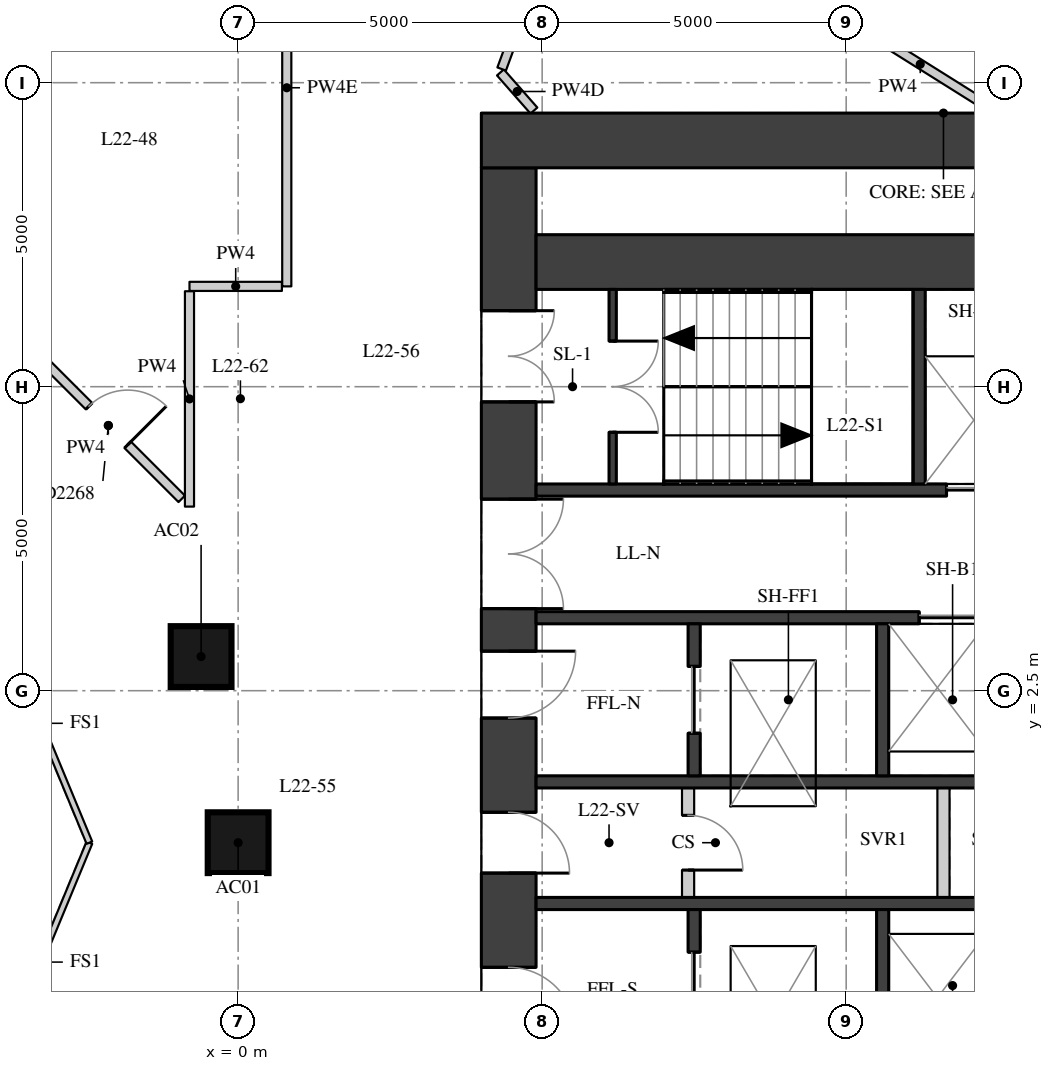
"""IFC4 building model, lengths in metres.
Left out: names, types, materials, properties, quantities, classifications, styles, units other than length and angle.
Written with IfcOpenShell. Run it as: python <this file> out.ifc"""

import sys

from ifc_helpers import new_model, si_unit, direction, frame, frame_2d, origin, origin_2d, place, context, subcontext, project, spatial, rectangle, extrude, element, fill, save


model = new_model("IFC4")
c1 = context("Model", 3, precision=1e-05, world=origin(), true_north=direction((0.0, 1.0)))
c2 = subcontext(c1, "Body", "Model", "MODEL_VIEW")
j1 = project(units=[si_unit("LENGTHUNIT", "METRE"), si_unit("PLANEANGLEUNIT", "RADIAN")], contexts=[c1])
p1 = place(None, origin())
s1 = spatial("IfcSite", under=j1, at=p1, CompositionType="ELEMENT")
p2 = place(p1, origin())
s2 = spatial("IfcBuilding", under=s1, at=p2, CompositionType="ELEMENT")
p3 = place(p2, frame((0.0, 0.0, 81.1)))
s3 = spatial("IfcBuildingStorey", under=s2, at=p3, CompositionType="ELEMENT", Elevation=81.1)
for number, where, z_axis, x_axis in (
    (1, (0.0, 0.0, 0.0), (0.0, 0.0, 1.0), (1.0, 0.0, 0.0)),
    (2, (-0.609, 3.062, 0.0), (0.0, 0.0, 1.0), (1.0, 0.0, 0.0)),
):
    element("IfcColumn", number, at=place(p3, frame(where, z_axis=z_axis, x_axis=x_axis)), inside=s3, PredefinedType="COLUMN", context=c2, shape_type="SweptSolid", body=[
        extrude(rectangle(XDim=1.0, YDim=1.0, at=origin_2d()), origin(), (0.0, 0.0, 1.0), 3.3),
    ])
p4 = place(p3, frame((4.45, -11.1, 0.0), z_axis=(0.0, 0.0, 1.0), x_axis=(0.0, 1.0, 0.0)))
e3 = element("IfcWall", 3, at=p4, inside=s3, PredefinedType="SHEAR", context=c2, shape_type="SweptSolid", body=[
    extrude(rectangle(XDim=22.2, YDim=0.9, at=frame_2d((11.1, 0.0))), origin(), (0.0, 0.0, 1.0), 2.85),
])
p5 = place(p4, frame((2.35, 0.0, 0.0)))
e4 = element("IfcOpeningElement", 4, at=p5, cuts=e3, PredefinedType="OPENING", context=c2, shape_type="SweptSolid", body=[
    extrude(rectangle(XDim=1.5, YDim=2.1, at=frame_2d((0.75, 1.05))), frame((0.0, 0.46, 0.0), z_axis=(0.0, -1.0, 0.0), x_axis=(1.0, 0.0, 0.0)), (0.0, 0.0, 1.0), 0.92),
])
p6 = place(p4, frame((5.45, 0.0, 0.0)))
e5 = element("IfcOpeningElement", 5, at=p6, cuts=e3, PredefinedType="OPENING", context=c2, shape_type="SweptSolid", body=[
    extrude(rectangle(XDim=1.8, YDim=2.1, at=frame_2d((0.9, 1.05))), frame((0.0, 0.46, 0.0), z_axis=(0.0, -1.0, 0.0), x_axis=(1.0, 0.0, 0.0)), (0.0, 0.0, 1.0), 0.92),
])
p7 = place(p4, frame((7.95, 0.0, 0.0)))
e6 = element("IfcOpeningElement", 6, at=p7, cuts=e3, PredefinedType="OPENING", context=c2, shape_type="SweptSolid", body=[
    extrude(rectangle(XDim=1.1, YDim=2.1, at=frame_2d((0.55, 1.05))), frame((0.0, 0.46, 0.0), z_axis=(0.0, -1.0, 0.0), x_axis=(1.0, 0.0, 0.0)), (0.0, 0.0, 1.0), 0.92),
])
p8 = place(p4, frame((10.6, 0.0, 0.0)))
e7 = element("IfcOpeningElement", 7, at=p8, cuts=e3, PredefinedType="OPENING", context=c2, shape_type="SweptSolid", body=[
    extrude(rectangle(XDim=1.0, YDim=2.1, at=frame_2d((0.5, 1.05))), frame((0.0, 0.46, 0.0), z_axis=(0.0, -1.0, 0.0), x_axis=(1.0, 0.0, 0.0)), (0.0, 0.0, 1.0), 0.92),
])
p9 = place(p4, frame((13.15, 0.0, 0.0)))
e8 = element("IfcOpeningElement", 8, at=p9, cuts=e3, PredefinedType="OPENING", context=c2, shape_type="SweptSolid", body=[
    extrude(rectangle(XDim=1.1, YDim=2.1, at=frame_2d((0.55, 1.05))), frame((0.0, 0.46, 0.0), z_axis=(0.0, -1.0, 0.0), x_axis=(1.0, 0.0, 0.0)), (0.0, 0.0, 1.0), 0.92),
])
p10 = place(p4, frame((14.95, 0.0, 0.0)))
e9 = element("IfcOpeningElement", 9, at=p10, cuts=e3, PredefinedType="OPENING", context=c2, shape_type="SweptSolid", body=[
    extrude(rectangle(XDim=1.8, YDim=2.1, at=frame_2d((0.9, 1.05))), frame((0.0, 0.46, 0.0), z_axis=(0.0, -1.0, 0.0), x_axis=(1.0, 0.0, 0.0)), (0.0, 0.0, 1.0), 0.92),
])
p11 = place(p4, frame((18.35, 0.0, 0.0)))
e10 = element("IfcOpeningElement", 10, at=p11, cuts=e3, PredefinedType="OPENING", context=c2, shape_type="SweptSolid", body=[
    extrude(rectangle(XDim=1.5, YDim=2.1, at=frame_2d((0.75, 1.05))), frame((0.0, 0.46, 0.0), z_axis=(0.0, -1.0, 0.0), x_axis=(1.0, 0.0, 0.0)), (0.0, 0.0, 1.0), 0.92),
])
p12 = place(p3, frame((4.0, 11.55, 0.0), z_axis=(0.0, 0.0, 1.0), x_axis=(1.0, 0.0, 0.0)))
e11 = element("IfcWall", 11, at=p12, inside=s3, PredefinedType="SHEAR", context=c2, shape_type="SweptSolid", body=[
    extrude(rectangle(XDim=15.2, YDim=0.9, at=frame_2d((7.6, 0.0))), origin(), (0.0, 0.0, 1.0), 2.85),
])
p13 = place(p3, frame((4.9, 9.55, 0.0), z_axis=(0.0, 0.0, 1.0), x_axis=(1.0, 0.0, 0.0)))
e12 = element("IfcWall", 12, at=p13, inside=s3, PredefinedType="SHEAR", context=c2, shape_type="SweptSolid", body=[
    extrude(rectangle(XDim=10.2, YDim=0.9, at=frame_2d((5.1, 0.0))), origin(), (0.0, 0.0, 1.0), 2.85),
])
p14 = place(p3, frame((4.9, 5.8, 0.0), z_axis=(0.0, 0.0, 1.0), x_axis=(1.0, 0.0, 0.0)))
e13 = element("IfcWall", 13, at=p14, inside=s3, PredefinedType="SHEAR", context=c2, shape_type="SweptSolid", body=[
    extrude(rectangle(XDim=10.2, YDim=0.2, at=frame_2d((5.1, 0.0))), origin(), (0.0, 0.0, 1.0), 2.85),
])
p15 = place(p14, frame((6.75, 0.0, 0.0)))
e14 = element("IfcOpeningElement", 14, at=p15, cuts=e13, PredefinedType="OPENING", context=c2, shape_type="SweptSolid", body=[
    extrude(rectangle(XDim=1.1, YDim=2.1, at=frame_2d((0.55, 1.05))), frame((0.0, 0.11, 0.0), z_axis=(0.0, -1.0, 0.0), x_axis=(1.0, 0.0, 0.0)), (0.0, 0.0, 1.0), 0.22),
])
p16 = place(p14, frame((8.75, 0.0, 0.0)))
e15 = element("IfcOpeningElement", 15, at=p16, cuts=e13, PredefinedType="OPENING", context=c2, shape_type="SweptSolid", body=[
    extrude(rectangle(XDim=1.1, YDim=2.1, at=frame_2d((0.55, 1.05))), frame((0.0, 0.11, 0.0), z_axis=(0.0, -1.0, 0.0), x_axis=(1.0, 0.0, 0.0)), (0.0, 0.0, 1.0), 0.22),
])
p17 = place(p3, frame((4.9, 3.7, 0.0), z_axis=(0.0, 0.0, 1.0), x_axis=(1.0, 0.0, 0.0)))
e16 = element("IfcWall", 16, at=p17, inside=s3, PredefinedType="SHEAR", context=c2, shape_type="SweptSolid", body=[
    extrude(rectangle(XDim=10.2, YDim=0.2, at=frame_2d((5.1, 0.0))), origin(), (0.0, 0.0, 1.0), 2.85),
])
p18 = place(p17, frame((6.3, 0.0, 0.0)))
e17 = element("IfcOpeningElement", 17, at=p18, cuts=e16, PredefinedType="OPENING", context=c2, shape_type="SweptSolid", body=[
    extrude(rectangle(XDim=1.1, YDim=2.1, at=frame_2d((0.55, 1.05))), frame((0.0, 0.11, 0.0), z_axis=(0.0, -1.0, 0.0), x_axis=(1.0, 0.0, 0.0)), (0.0, 0.0, 1.0), 0.22),
])
p19 = place(p17, frame((8.6, 0.0, 0.0)))
e18 = element("IfcOpeningElement", 18, at=p19, cuts=e16, PredefinedType="OPENING", context=c2, shape_type="SweptSolid", body=[
    extrude(rectangle(XDim=1.1, YDim=2.1, at=frame_2d((0.55, 1.05))), frame((0.0, 0.11, 0.0), z_axis=(0.0, -1.0, 0.0), x_axis=(1.0, 0.0, 0.0)), (0.0, 0.0, 1.0), 0.22),
])
for number, where, z_axis, x_axis in (
    (19, (4.9, 1.0, 0.0), (0.0, 0.0, 1.0), (1.0, 0.0, 0.0)),
    (20, (4.9, -1.0, 0.0), (0.0, 0.0, 1.0), (1.0, 0.0, 0.0)),
):
    element("IfcWall", number, at=place(p3, frame(where, z_axis=z_axis, x_axis=x_axis)), inside=s3, PredefinedType="SHEAR", context=c2, shape_type="SweptSolid", body=[
        extrude(rectangle(XDim=10.2, YDim=0.2, at=frame_2d((5.1, 0.0))), origin(), (0.0, 0.0, 1.0), 2.85),
    ])
p20 = place(p3, frame((11.2, 5.9, 0.0), z_axis=(0.0, 0.0, 1.0), x_axis=(0.0, 1.0, 0.0)))
e21 = element("IfcWall", 21, at=p20, inside=s3, PredefinedType="SHEAR", context=c2, shape_type="SweptSolid", body=[
    extrude(rectangle(XDim=3.2, YDim=0.2, at=frame_2d((1.6, 0.0))), origin(), (0.0, 0.0, 1.0), 2.85),
])
p21 = place(p3, frame((7.5, 1.1, 0.0), z_axis=(0.0, 0.0, 1.0), x_axis=(0.0, 1.0, 0.0)))
e22 = element("IfcWall", 22, at=p21, inside=s3, PredefinedType="SHEAR", context=c2, shape_type="SweptSolid", body=[
    extrude(rectangle(XDim=2.5, YDim=0.2, at=frame_2d((1.25, 0.0))), origin(), (0.0, 0.0, 1.0), 2.85),
])
p22 = place(p21, frame((0.7, 0.0, 0.0)))
e23 = element("IfcOpeningElement", 23, at=p22, cuts=e22, PredefinedType="OPENING", context=c2, shape_type="SweptSolid", body=[
    extrude(rectangle(XDim=1.1, YDim=2.1, at=frame_2d((0.55, 1.05))), frame((0.0, 0.11, 0.0), z_axis=(0.0, -1.0, 0.0), x_axis=(1.0, 0.0, 0.0)), (0.0, 0.0, 1.0), 0.22),
])
p23 = place(p3, frame((7.5, -3.6, 0.0), z_axis=(0.0, 0.0, 1.0), x_axis=(0.0, 1.0, 0.0)))
e24 = element("IfcWall", 24, at=p23, inside=s3, PredefinedType="SHEAR", context=c2, shape_type="SweptSolid", body=[
    extrude(rectangle(XDim=2.5, YDim=0.2, at=frame_2d((1.25, 0.0))), origin(), (0.0, 0.0, 1.0), 2.85),
])
p24 = place(p23, frame((0.7, 0.0, 0.0)))
e25 = element("IfcOpeningElement", 25, at=p24, cuts=e24, PredefinedType="OPENING", context=c2, shape_type="SweptSolid", body=[
    extrude(rectangle(XDim=1.1, YDim=2.1, at=frame_2d((0.55, 1.05))), frame((0.0, 0.11, 0.0), z_axis=(0.0, -1.0, 0.0), x_axis=(1.0, 0.0, 0.0)), (0.0, 0.0, 1.0), 0.22),
])
for number, where, z_axis, x_axis in (
    (26, (10.6, 1.1, 0.0), (0.0, 0.0, 1.0), (0.0, 1.0, 0.0)),
    (27, (10.6, -3.6, 0.0), (0.0, 0.0, 1.0), (0.0, 1.0, 0.0)),
):
    element("IfcWall", number, at=place(p3, frame(where, z_axis=z_axis, x_axis=x_axis)), inside=s3, PredefinedType="SHEAR", context=c2, shape_type="SweptSolid", body=[
        extrude(rectangle(XDim=2.5, YDim=0.2, at=frame_2d((1.25, 0.0))), origin(), (0.0, 0.0, 1.0), 2.85),
    ])
p25 = place(p3, frame((6.16, 5.9, 0.0), z_axis=(0.0, 0.0, 1.0), x_axis=(0.0, 1.0, 0.0)))
e28 = element("IfcWall", 28, at=p25, inside=s3, PredefinedType="SHEAR", context=c2, shape_type="SweptSolid", body=[
    extrude(rectangle(XDim=3.2, YDim=0.12, at=frame_2d((1.6, 0.0))), origin(), (0.0, 0.0, 1.0), 2.85),
])
p26 = place(p25, frame((0.85, 0.0, 0.0)))
e29 = element("IfcOpeningElement", 29, at=p26, cuts=e28, PredefinedType="OPENING", context=c2, shape_type="SweptSolid", body=[
    extrude(rectangle(XDim=1.5, YDim=2.1, at=frame_2d((0.75, 1.05))), frame((0.0, 0.07, 0.0), z_axis=(0.0, -1.0, 0.0), x_axis=(1.0, 0.0, 0.0)), (0.0, 0.0, 1.0), 0.14),
])
p27 = place(p3, frame((7.4, -0.9, 0.0), z_axis=(0.0, 0.0, 1.0), x_axis=(0.0, 1.0, 0.0)))
e30 = element("IfcWall", 30, at=p27, inside=s3, PredefinedType="PARTITIONING", context=c2, shape_type="SweptSolid", body=[
    extrude(rectangle(XDim=1.8, YDim=0.2, at=frame_2d((0.9, 0.0))), origin(), (0.0, 0.0, 1.0), 2.85),
])
p28 = place(p27, frame((0.45, 0.0, 0.0)))
e31 = element("IfcOpeningElement", 31, at=p28, cuts=e30, PredefinedType="OPENING", context=c2, shape_type="SweptSolid", body=[
    extrude(rectangle(XDim=0.9, YDim=2.1, at=frame_2d((0.45, 1.05))), frame((0.0, 0.11, 0.0), z_axis=(0.0, -1.0, 0.0), x_axis=(1.0, 0.0, 0.0)), (0.0, 0.0, 1.0), 0.22),
])
p29 = place(p3, frame((11.6, -0.9, 0.0), z_axis=(0.0, 0.0, 1.0), x_axis=(0.0, 1.0, 0.0)))
e32 = element("IfcWall", 32, at=p29, inside=s3, PredefinedType="PARTITIONING", context=c2, shape_type="SweptSolid", body=[
    extrude(rectangle(XDim=1.8, YDim=0.2, at=frame_2d((0.9, 0.0))), origin(), (0.0, 0.0, 1.0), 2.85),
])
p30 = place(p3, frame((0.8, 15.684, 0.0), z_axis=(0.0, 0.0, 1.0), x_axis=(0.0, -1.0, 0.0)))
e33 = element("IfcWall", 33, at=p30, inside=s3, PredefinedType="PARTITIONING", context=c2, shape_type="SweptSolid", body=[
    extrude(rectangle(XDim=6.534, YDim=0.15, at=frame_2d((3.267, 0.0))), origin(), (0.0, 0.0, 1.0), 2.3),
])
p31 = place(p3, frame((0.72, 9.15, 0.0), z_axis=(0.0, 0.0, 1.0), x_axis=(-1.0, 0.0, 0.0)))
e34 = element("IfcWall", 34, at=p31, inside=s3, PredefinedType="PARTITIONING", context=c2, shape_type="SweptSolid", body=[
    extrude(rectangle(XDim=1.52, YDim=0.15, at=frame_2d((0.76, 0.0))), origin(), (0.0, 0.0, 1.0), 2.85),
])
p32 = place(p3, frame((-0.8, 9.07, 0.0), z_axis=(0.0, 0.0, 1.0), x_axis=(0.0, -1.0, 0.0)))
e35 = element("IfcWall", 35, at=p32, inside=s3, PredefinedType="PARTITIONING", context=c2, shape_type="SweptSolid", body=[
    extrude(rectangle(XDim=3.542, YDim=0.15, at=frame_2d((1.771, 0.0))), origin(), (0.0, 0.0, 1.0), 2.85),
])
p33 = place(p3, frame((-0.927, 5.655, 0.0), z_axis=(0.0, 0.0, 1.0), x_axis=(-0.707106781187, 0.707106781187, 0.0)))
e36 = element("IfcWall", 36, at=p33, inside=s3, PredefinedType="PARTITIONING", context=c2, shape_type="SweptSolid", body=[
    extrude(rectangle(XDim=3.414, YDim=0.15, at=frame_2d((1.707, 0.0))), origin(), (0.0, 0.0, 1.0), 2.85),
])
p34 = place(p33, frame((1.257, 0.0, 0.0)))
e37 = element("IfcOpeningElement", 37, at=p34, cuts=e36, PredefinedType="OPENING", context=c2, shape_type="SweptSolid", body=[
    extrude(rectangle(XDim=0.9, YDim=2.1, at=frame_2d((0.45, 1.05))), frame((0.0, 0.085, 0.0), z_axis=(0.0, -1.0, 0.0), x_axis=(1.0, 0.0, 0.0)), (0.0, 0.0, 1.0), 0.17),
])
p35 = place(p3, frame((4.865, 12.042, 0.0), z_axis=(0.0, 0.0, 1.0), x_axis=(-0.660014599896, 0.751252772323, 0.0)))
e38 = element("IfcWall", 38, at=p35, inside=s3, PredefinedType="PARTITIONING", context=c2, shape_type="SweptSolid", body=[
    extrude(rectangle(XDim=0.835, YDim=0.15, at=frame_2d((0.417, 0.0))), origin(), (0.0, 0.0, 1.0), 2.4),
])
p36 = place(p3, frame((4.334, 12.725, 0.0), z_axis=(0.0, 0.0, 1.0), x_axis=(0.345226102509, 0.938519545959, 0.0)))
e39 = element("IfcWall", 39, at=p36, inside=s3, PredefinedType="PARTITIONING", context=c2, shape_type="SweptSolid", body=[
    extrude(rectangle(XDim=2.148, YDim=0.15, at=frame_2d((1.074, 0.0))), origin(), (0.0, 0.0, 1.0), 2.85),
])
p37 = place(p3, frame((10.028, 13.551, 0.0), z_axis=(0.0, 0.0, 1.0), x_axis=(0.847128314977, -0.531388387118, 0.0)))
e40 = element("IfcWall", 40, at=p37, inside=s3, PredefinedType="PARTITIONING", context=c2, shape_type="SweptSolid", body=[
    extrude(rectangle(XDim=2.81, YDim=0.15, at=frame_2d((1.405, 0.0))), origin(), (0.0, 0.0, 1.0), 2.85),
])
for number, where, z_axis, x_axis in (
    (41, (-2.446, 0.0, 0.0), (0.0, 0.0, 1.0), (-0.383, -0.924, 0.0)),
    (42, (-4.073, 3.927, 0.0), (0.0, 0.0, 1.0), (0.383, -0.924, 0.0)),
):
    element("IfcWall", number, at=place(p3, frame(where, z_axis=z_axis, x_axis=x_axis)), inside=s3, PredefinedType="PARTITIONING", context=c2, shape_type="SweptSolid", body=[
        extrude(rectangle(XDim=4.251, YDim=0.1, at=frame_2d((2.125, 0.0))), origin(), (0.0, 0.0, 1.0), 2.85),
    ])
p38 = place(p7, origin())
e43 = element("IfcDoor", 43, at=p38, inside=s3, OperationType="SINGLE_SWING_RIGHT", PredefinedType="DOOR", context=c2, shape_type="SweptSolid", body=[
    extrude(rectangle(XDim=1.1, YDim=2.1, at=frame_2d((0.55, 1.05))), frame((0.0, 0.025, 0.0), z_axis=(0.0, -1.0, 0.0), x_axis=(1.0, 0.0, 0.0)), (0.0, 0.0, 1.0), 0.05),
])
fill(e6, e43)
p39 = place(p8, origin())
e44 = element("IfcDoor", 44, at=p39, inside=s3, OperationType="SINGLE_SWING_RIGHT", PredefinedType="DOOR", context=c2, shape_type="SweptSolid", body=[
    extrude(rectangle(XDim=1.0, YDim=2.1, at=frame_2d((0.5, 1.05))), frame((0.0, 0.025, 0.0), z_axis=(0.0, -1.0, 0.0), x_axis=(1.0, 0.0, 0.0)), (0.0, 0.0, 1.0), 0.05),
])
fill(e7, e44)
p40 = place(p9, origin())
e45 = element("IfcDoor", 45, at=p40, inside=s3, OperationType="SINGLE_SWING_LEFT", PredefinedType="DOOR", context=c2, shape_type="SweptSolid", body=[
    extrude(rectangle(XDim=1.1, YDim=2.1, at=frame_2d((0.55, 1.05))), frame((0.0, 0.025, 0.0), z_axis=(0.0, -1.0, 0.0), x_axis=(1.0, 0.0, 0.0)), (0.0, 0.0, 1.0), 0.05),
])
fill(e8, e45)
p41 = place(p10, origin())
e46 = element("IfcDoor", 46, at=p41, inside=s3, OperationType="DOUBLE_DOOR_SINGLE_SWING", PredefinedType="DOOR", context=c2, shape_type="SweptSolid", body=[
    extrude(rectangle(XDim=1.8, YDim=2.1, at=frame_2d((0.9, 1.05))), frame((0.0, 0.025, 0.0), z_axis=(0.0, -1.0, 0.0), x_axis=(1.0, 0.0, 0.0)), (0.0, 0.0, 1.0), 0.05),
])
fill(e9, e46)
p42 = place(p11, origin())
e47 = element("IfcDoor", 47, at=p42, inside=s3, OperationType="DOUBLE_DOOR_SINGLE_SWING", PredefinedType="DOOR", context=c2, shape_type="SweptSolid", body=[
    extrude(rectangle(XDim=1.5, YDim=2.1, at=frame_2d((0.75, 1.05))), frame((0.0, 0.025, 0.0), z_axis=(0.0, -1.0, 0.0), x_axis=(1.0, 0.0, 0.0)), (0.0, 0.0, 1.0), 0.05),
])
fill(e10, e47)
p43 = place(p26, origin())
e48 = element("IfcDoor", 48, at=p43, inside=s3, OperationType="DOUBLE_DOOR_SINGLE_SWING", PredefinedType="DOOR", context=c2, shape_type="SweptSolid", body=[
    extrude(rectangle(XDim=1.5, YDim=2.1, at=frame_2d((0.75, 1.05))), frame((0.0, 0.025, 0.0), z_axis=(0.0, -1.0, 0.0), x_axis=(1.0, 0.0, 0.0)), (0.0, 0.0, 1.0), 0.05),
])
fill(e29, e48)
p44 = place(p15, origin())
e49 = element("IfcDoor", 49, at=p44, inside=s3, OperationType="DOUBLE_DOOR_SLIDING", PredefinedType="DOOR", context=c2, shape_type="SweptSolid", body=[
    extrude(rectangle(XDim=1.1, YDim=2.1, at=frame_2d((0.55, 1.05))), frame((0.0, 0.025, 0.0), z_axis=(0.0, -1.0, 0.0), x_axis=(1.0, 0.0, 0.0)), (0.0, 0.0, 1.0), 0.05),
])
fill(e14, e49)
p45 = place(p18, origin())
e50 = element("IfcDoor", 50, at=p45, inside=s3, OperationType="DOUBLE_DOOR_SLIDING", PredefinedType="DOOR", context=c2, shape_type="SweptSolid", body=[
    extrude(rectangle(XDim=1.1, YDim=2.1, at=frame_2d((0.55, 1.05))), frame((0.0, 0.025, 0.0), z_axis=(0.0, -1.0, 0.0), x_axis=(1.0, 0.0, 0.0)), (0.0, 0.0, 1.0), 0.05),
])
fill(e17, e50)
p46 = place(p22, origin())
e51 = element("IfcDoor", 51, at=p46, inside=s3, OperationType="DOUBLE_DOOR_SLIDING", PredefinedType="DOOR", context=c2, shape_type="SweptSolid", body=[
    extrude(rectangle(XDim=1.1, YDim=2.1, at=frame_2d((0.55, 1.05))), frame((0.0, 0.025, 0.0), z_axis=(0.0, -1.0, 0.0), x_axis=(1.0, 0.0, 0.0)), (0.0, 0.0, 1.0), 0.05),
])
fill(e23, e51)
p47 = place(p24, origin())
e52 = element("IfcDoor", 52, at=p47, inside=s3, OperationType="DOUBLE_DOOR_SLIDING", PredefinedType="DOOR", context=c2, shape_type="SweptSolid", body=[
    extrude(rectangle(XDim=1.1, YDim=2.1, at=frame_2d((0.55, 1.05))), frame((0.0, 0.025, 0.0), z_axis=(0.0, -1.0, 0.0), x_axis=(1.0, 0.0, 0.0)), (0.0, 0.0, 1.0), 0.05),
])
fill(e25, e52)
p48 = place(p28, origin())
e53 = element("IfcDoor", 53, at=p48, inside=s3, OperationType="SINGLE_SWING_RIGHT", PredefinedType="DOOR", context=c2, shape_type="SweptSolid", body=[
    extrude(rectangle(XDim=0.9, YDim=2.1, at=frame_2d((0.45, 1.05))), frame((0.0, 0.025, 0.0), z_axis=(0.0, -1.0, 0.0), x_axis=(1.0, 0.0, 0.0)), (0.0, 0.0, 1.0), 0.05),
])
fill(e31, e53)
p49 = place(p34, origin())
e54 = element("IfcDoor", 54, at=p49, inside=s3, OperationType="SINGLE_SWING_RIGHT", PredefinedType="DOOR", context=c2, shape_type="SweptSolid", body=[
    extrude(rectangle(XDim=0.9, YDim=2.1, at=frame_2d((0.45, 1.05))), frame((0.0, 0.025, 0.0), z_axis=(0.0, -1.0, 0.0), x_axis=(1.0, 0.0, 0.0)), (0.0, 0.0, 1.0), 0.05),
])
fill(e37, e54)
save(model, sys.argv[1])
